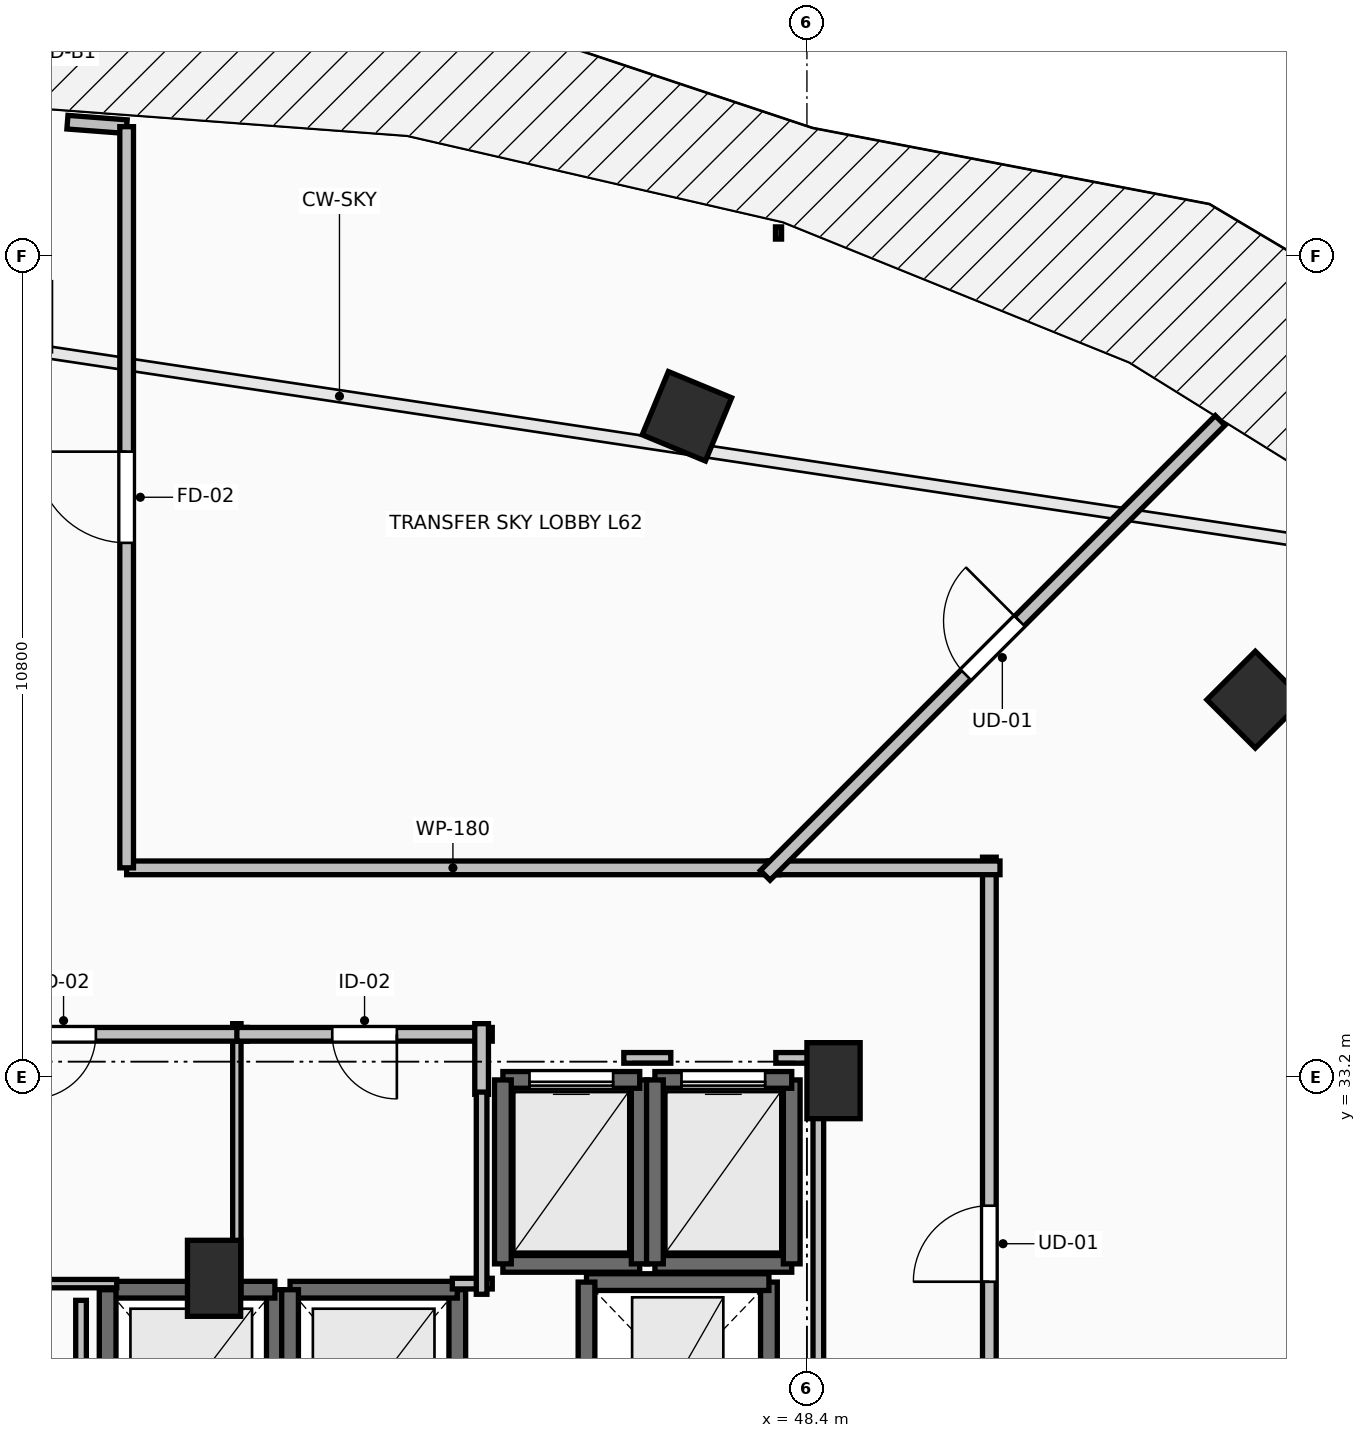
"""IFC4 building model, lengths in metres.
Left out: names, types, materials, properties, quantities, classifications, styles, units other than length and angle.
Written with IfcOpenShell. Run it as: python <this file> out.ifc"""

import sys

from ifc_helpers import new_model, si_unit, direction, frame, frame_2d, origin, origin_2d, place, context, subcontext, project, spatial, rectangle, extrude, element, fill, save


model = new_model("IFC4")
c1 = context("Model", 3, precision=1e-05, world=origin(), true_north=direction((0.0, 1.0)))
c2 = subcontext(c1, "Body", "Model", "MODEL_VIEW")
j1 = project(units=[si_unit("LENGTHUNIT", "METRE"), si_unit("PLANEANGLEUNIT", "RADIAN")], contexts=[c1])
p1 = place(None, origin())
s1 = spatial("IfcSite", under=j1, at=p1, CompositionType="ELEMENT")
p2 = place(p1, origin())
s2 = spatial("IfcBuilding", under=s1, at=p2, CompositionType="ELEMENT")
p3 = place(p2, frame((0.0, 0.0, 229.75)))
s3 = spatial("IfcBuildingStorey", under=s2, at=p3, CompositionType="ELEMENT", Elevation=229.75)
for number, where, z_axis, x_axis in (
    (1, (54.299, 38.162, 0.0), (0.0, 0.0, 1.0), (0.707, 0.707, 0.0)),
    (2, (46.821, 41.891, 0.0), (0.0, 0.0, 1.0), (0.383, 0.924, 0.0)),
):
    element("IfcColumn", number, at=place(p3, frame(where, z_axis=z_axis, x_axis=x_axis)), inside=s3, PredefinedType="COLUMN", context=c2, shape_type="SweptSolid", body=[
        extrude(rectangle(XDim=0.9, YDim=0.9, at=origin_2d()), origin(), (0.0, 0.0, 1.0), 4.5),
    ])
for number, where, z_axis, x_axis in (
    (3, (48.75, 33.15, 0.0), (0.0, 0.0, 1.0), (1.0, 0.0, 0.0)),
    (4, (40.6, 30.55, 0.0), (0.0, 0.0, 1.0), (1.0, 0.0, 0.0)),
):
    element("IfcColumn", number, at=place(p3, frame(where, z_axis=z_axis, x_axis=x_axis)), inside=s3, PredefinedType="PILASTER", context=c2, shape_type="SweptSolid", body=[
        extrude(rectangle(XDim=0.7, YDim=1.0, at=origin_2d()), origin(), (0.0, 0.0, 1.0), 4.5),
    ])
p4 = place(p3, frame((41.4, 27.8, 0.0), z_axis=(0.0, 0.0, 1.0), x_axis=(0.0, 1.0, 0.0)))
e5 = element("IfcWall", 5, at=p4, inside=s3, PredefinedType="SOLIDWALL", context=c2, shape_type="SweptSolid", body=[
    extrude(rectangle(XDim=2.6, YDim=0.22, at=frame_2d((1.3, 0.0))), origin(), (0.0, 0.0, 1.0), 4.24),
])
p5 = place(p3, frame((41.4, 30.4, 0.0), z_axis=(0.0, 0.0, 1.0), x_axis=(-1.0, 0.0, 0.0)))
e6 = element("IfcWall", 6, at=p5, inside=s3, PredefinedType="SOLIDWALL", context=c2, shape_type="SweptSolid", body=[
    extrude(rectangle(XDim=2.2, YDim=0.22, at=frame_2d((1.1, 0.0))), origin(), (0.0, 0.0, 1.0), 4.24),
])
for number, where, z_axis, x_axis in (
    (7, (39.2, 30.4, 0.0), (0.0, 0.0, 1.0), (0.0, -1.0, 0.0)),
    (8, (43.8, 27.8, 0.0), (0.0, 0.0, 1.0), (0.0, 1.0, 0.0)),
):
    element("IfcWall", number, at=place(p3, frame(where, z_axis=z_axis, x_axis=x_axis)), inside=s3, PredefinedType="SOLIDWALL", context=c2, shape_type="SweptSolid", body=[
        extrude(rectangle(XDim=2.6, YDim=0.22, at=frame_2d((1.3, 0.0))), origin(), (0.0, 0.0, 1.0), 4.24),
    ])
p6 = place(p3, frame((43.8, 30.4, 0.0), z_axis=(0.0, 0.0, 1.0), x_axis=(-1.0, 0.0, 0.0)))
e9 = element("IfcWall", 9, at=p6, inside=s3, PredefinedType="SOLIDWALL", context=c2, shape_type="SweptSolid", body=[
    extrude(rectangle(XDim=2.2, YDim=0.22, at=frame_2d((1.1, 0.0))), origin(), (0.0, 0.0, 1.0), 4.24),
])
p7 = place(p3, frame((41.6, 30.4, 0.0), z_axis=(0.0, 0.0, 1.0), x_axis=(0.0, -1.0, 0.0)))
e10 = element("IfcWall", 10, at=p7, inside=s3, PredefinedType="SOLIDWALL", context=c2, shape_type="SweptSolid", body=[
    extrude(rectangle(XDim=2.6, YDim=0.22, at=frame_2d((1.3, 0.0))), origin(), (0.0, 0.0, 1.0), 4.24),
])
p8 = place(p3, frame((44.4, 30.74, 0.0), z_axis=(0.0, 0.0, 1.0), x_axis=(1.0, 0.0, 0.0)))
e11 = element("IfcWall", 11, at=p8, inside=s3, PredefinedType="SOLIDWALL", context=c2, shape_type="SweptSolid", body=[
    extrude(rectangle(XDim=1.8, YDim=0.22, at=frame_2d((0.9, 0.0))), origin(), (0.0, 0.0, 1.0), 4.24),
])
p9 = place(p3, frame((46.2, 30.74, 0.0), z_axis=(0.0, 0.0, 1.0), x_axis=(0.0, 1.0, 0.0)))
e12 = element("IfcWall", 12, at=p9, inside=s3, PredefinedType="SOLIDWALL", context=c2, shape_type="SweptSolid", body=[
    extrude(rectangle(XDim=2.42, YDim=0.22, at=frame_2d((1.21, 0.0))), origin(), (0.0, 0.0, 1.0), 4.24),
])
p10 = place(p3, frame((46.2, 33.16, 0.0), z_axis=(0.0, 0.0, 1.0), x_axis=(-1.0, 0.0, 0.0)))
e13 = element("IfcWall", 13, at=p10, inside=s3, PredefinedType="SOLIDWALL", context=c2, shape_type="SweptSolid", body=[
    extrude(rectangle(XDim=1.8, YDim=0.22, at=frame_2d((0.9, 0.0))), origin(), (0.0, 0.0, 1.0), 4.24),
])
p11 = place(p10, frame((0.35, 0.0, 0.0)))
e14 = element("IfcOpeningElement", 14, at=p11, cuts=e13, PredefinedType="OPENING", context=c2, shape_type="SweptSolid", body=[
    extrude(rectangle(XDim=1.1, YDim=2.2, at=frame_2d((0.55, 1.1))), frame((0.0, 0.125, 0.0), z_axis=(0.0, -1.0, 0.0), x_axis=(1.0, 0.0, 0.0)), (0.0, 0.0, 1.0), 0.25),
])
p12 = place(p3, frame((44.4, 33.16, 0.0), z_axis=(0.0, 0.0, 1.0), x_axis=(0.0, -1.0, 0.0)))
e15 = element("IfcWall", 15, at=p12, inside=s3, PredefinedType="SOLIDWALL", context=c2, shape_type="SweptSolid", body=[
    extrude(rectangle(XDim=2.42, YDim=0.22, at=frame_2d((1.21, 0.0))), origin(), (0.0, 0.0, 1.0), 4.24),
])
p13 = place(p3, frame((46.4, 30.74, 0.0), z_axis=(0.0, 0.0, 1.0), x_axis=(1.0, 0.0, 0.0)))
e16 = element("IfcWall", 16, at=p13, inside=s3, PredefinedType="SOLIDWALL", context=c2, shape_type="SweptSolid", body=[
    extrude(rectangle(XDim=1.8, YDim=0.22, at=frame_2d((0.9, 0.0))), origin(), (0.0, 0.0, 1.0), 4.24),
])
p14 = place(p3, frame((48.2, 30.74, 0.0), z_axis=(0.0, 0.0, 1.0), x_axis=(0.0, 1.0, 0.0)))
e17 = element("IfcWall", 17, at=p14, inside=s3, PredefinedType="SOLIDWALL", context=c2, shape_type="SweptSolid", body=[
    extrude(rectangle(XDim=2.42, YDim=0.22, at=frame_2d((1.21, 0.0))), origin(), (0.0, 0.0, 1.0), 4.24),
])
p15 = place(p3, frame((48.2, 33.16, 0.0), z_axis=(0.0, 0.0, 1.0), x_axis=(-1.0, 0.0, 0.0)))
e18 = element("IfcWall", 18, at=p15, inside=s3, PredefinedType="SOLIDWALL", context=c2, shape_type="SweptSolid", body=[
    extrude(rectangle(XDim=1.8, YDim=0.22, at=frame_2d((0.9, 0.0))), origin(), (0.0, 0.0, 1.0), 4.24),
])
p16 = place(p15, frame((0.35, 0.0, 0.0)))
e19 = element("IfcOpeningElement", 19, at=p16, cuts=e18, PredefinedType="OPENING", context=c2, shape_type="SweptSolid", body=[
    extrude(rectangle(XDim=1.1, YDim=2.2, at=frame_2d((0.55, 1.1))), frame((0.0, 0.125, 0.0), z_axis=(0.0, -1.0, 0.0), x_axis=(1.0, 0.0, 0.0)), (0.0, 0.0, 1.0), 0.25),
])
p17 = place(p3, frame((46.4, 33.16, 0.0), z_axis=(0.0, 0.0, 1.0), x_axis=(0.0, -1.0, 0.0)))
e20 = element("IfcWall", 20, at=p17, inside=s3, PredefinedType="SOLIDWALL", context=c2, shape_type="SweptSolid", body=[
    extrude(rectangle(XDim=2.42, YDim=0.22, at=frame_2d((1.21, 0.0))), origin(), (0.0, 0.0, 1.0), 4.24),
])
p18 = place(p3, frame((47.9, 28.0, 0.0), z_axis=(0.0, 0.0, 1.0), x_axis=(0.0, 1.0, 0.0)))
e21 = element("IfcWall", 21, at=p18, inside=s3, PredefinedType="SHEAR", context=c2, shape_type="SweptSolid", body=[
    extrude(rectangle(XDim=2.5, YDim=0.22, at=frame_2d((1.25, 0.0))), origin(), (0.0, 0.0, 1.0), 4.24),
])
p19 = place(p3, frame((47.9, 30.5, 0.0), z_axis=(0.0, 0.0, 1.0), x_axis=(-1.0, 0.0, 0.0)))
e22 = element("IfcWall", 22, at=p19, inside=s3, PredefinedType="SHEAR", context=c2, shape_type="SweptSolid", body=[
    extrude(rectangle(XDim=2.4, YDim=0.22, at=frame_2d((1.2, 0.0))), origin(), (0.0, 0.0, 1.0), 4.24),
])
p20 = place(p3, frame((45.5, 30.5, 0.0), z_axis=(0.0, 0.0, 1.0), x_axis=(0.0, -1.0, 0.0)))
e23 = element("IfcWall", 23, at=p20, inside=s3, PredefinedType="SHEAR", context=c2, shape_type="SweptSolid", body=[
    extrude(rectangle(XDim=2.5, YDim=0.22, at=frame_2d((1.25, 0.0))), origin(), (0.0, 0.0, 1.0), 4.24),
])
p21 = place(p3, frame((40.9, 30.34, 0.0), z_axis=(0.0, 0.0, 1.0), x_axis=(0.0, 1.0, 0.0)))
e24 = element("IfcWall", 24, at=p21, inside=s3, PredefinedType="PARTITIONING", context=c2, shape_type="SweptSolid", body=[
    extrude(rectangle(XDim=3.56, YDim=0.11, at=frame_2d((1.78, 0.0))), origin(), (0.0, 0.0, 1.0), 4.24),
])
p22 = place(p3, frame((36.11, 30.48, 0.0), z_axis=(0.0, 0.0, 1.0), x_axis=(1.0, 0.0, 0.0)))
e25 = element("IfcWall", 25, at=p22, inside=s3, PredefinedType="PARTITIONING", context=c2, shape_type="SweptSolid", body=[
    extrude(rectangle(XDim=3.21, YDim=0.11, at=frame_2d((1.605, 0.0))), origin(), (0.0, 0.0, 1.0), 3.432),
])
p23 = place(p3, frame((41.04, 33.76, 0.0), z_axis=(0.0, 0.0, 1.0), x_axis=(-1.0, 0.0, 0.0)))
e26 = element("IfcWall", 26, at=p23, inside=s3, PredefinedType="PARTITIONING", context=c2, shape_type="SweptSolid", body=[
    extrude(rectangle(XDim=4.84, YDim=0.18, at=frame_2d((2.42, 0.0))), origin(), (0.0, 0.0, 1.0), 4.24),
])
p24 = place(p23, frame((1.995, 0.0, 0.0)))
e27 = element("IfcOpeningElement", 27, at=p24, cuts=e26, PredefinedType="OPENING", context=c2, shape_type="SweptSolid", body=[
    extrude(rectangle(XDim=0.85, YDim=2.1, at=frame_2d((0.425, 1.05))), frame((0.0, 0.105, 0.0), z_axis=(0.0, -1.0, 0.0), x_axis=(1.0, 0.0, 0.0)), (0.0, 0.0, 1.0), 0.21),
])
p25 = place(p3, frame((44.26, 33.76, 0.0), z_axis=(0.0, 0.0, 1.0), x_axis=(-1.0, 0.0, 0.0)))
e28 = element("IfcWall", 28, at=p25, inside=s3, PredefinedType="PARTITIONING", context=c2, shape_type="SweptSolid", body=[
    extrude(rectangle(XDim=3.36, YDim=0.18, at=frame_2d((1.68, 0.0))), origin(), (0.0, 0.0, 1.0), 4.24),
])
p26 = place(p25, frame((1.255, 0.0, 0.0)))
e29 = element("IfcOpeningElement", 29, at=p26, cuts=e28, PredefinedType="OPENING", context=c2, shape_type="SweptSolid", body=[
    extrude(rectangle(XDim=0.85, YDim=2.1, at=frame_2d((0.425, 1.05))), frame((0.0, 0.105, 0.0), z_axis=(0.0, -1.0, 0.0), x_axis=(1.0, 0.0, 0.0)), (0.0, 0.0, 1.0), 0.21),
])
p27 = place(p3, frame((44.12, 32.97, 0.0), z_axis=(0.0, 0.0, 1.0), x_axis=(0.0, 1.0, 0.0)))
e30 = element("IfcWall", 30, at=p27, inside=s3, PredefinedType="PARTITIONING", context=c2, shape_type="SweptSolid", body=[
    extrude(rectangle(XDim=0.93, YDim=0.18, at=frame_2d((0.465, 0.0))), origin(), (0.0, 0.0, 1.0), 4.24),
])
p28 = place(p3, frame((39.45, 45.701, 0.0), z_axis=(0.0, 0.0, 1.0), x_axis=(-0.997136622012, 0.0756211415, 0.0)))
e31 = element("IfcWall", 31, at=p28, inside=s3, PredefinedType="PARTITIONING", context=c2, shape_type="SweptSolid", body=[
    extrude(rectangle(XDim=0.781, YDim=0.18, at=frame_2d((0.391, 0.0))), origin(), (0.0, 0.0, 1.0), 4.24),
])
p29 = place(p3, frame((48.035, 35.95, 0.0), z_axis=(0.0, 0.0, 1.0), x_axis=(-1.0, 0.0, 0.0)))
e32 = element("IfcWall", 32, at=p29, inside=s3, PredefinedType="PARTITIONING", context=c2, shape_type="SweptSolid", body=[
    extrude(rectangle(XDim=8.585, YDim=0.18, at=frame_2d((4.292, 0.0))), origin(), (0.0, 0.0, 1.0), 3.432),
])
p30 = place(p3, frame((39.45, 35.95, 0.0), z_axis=(0.0, 0.0, 1.0), x_axis=(0.0, 1.0, 0.0)))
e33 = element("IfcWall", 33, at=p30, inside=s3, PredefinedType="PARTITIONING", context=c2, shape_type="SweptSolid", body=[
    extrude(rectangle(XDim=9.751, YDim=0.18, at=frame_2d((4.875, 0.0))), origin(), (0.0, 0.0, 1.0), 3.774),
])
p31 = place(p30, frame((4.275, 0.0, 0.0)))
e34 = element("IfcOpeningElement", 34, at=p31, cuts=e33, PredefinedType="OPENING", context=c2, shape_type="SweptSolid", body=[
    extrude(rectangle(XDim=1.2, YDim=2.15, at=frame_2d((0.6, 1.075))), frame((0.0, 0.105, 0.0), z_axis=(0.0, -1.0, 0.0), x_axis=(1.0, 0.0, 0.0)), (0.0, 0.0, 1.0), 0.21),
])
p32 = place(p3, frame((50.8, 25.92, 0.0), z_axis=(0.0, 0.0, 1.0), x_axis=(0.0, 1.0, 0.0)))
e35 = element("IfcWall", 35, at=p32, inside=s3, PredefinedType="PARTITIONING", context=c2, shape_type="SweptSolid", body=[
    extrude(rectangle(XDim=10.17, YDim=0.18, at=frame_2d((5.085, 0.0))), origin(), (0.0, 0.0, 1.0), 3.432),
])
p33 = place(p32, frame((4.585, 0.0, 0.0)))
e36 = element("IfcOpeningElement", 36, at=p33, cuts=e35, PredefinedType="OPENING", context=c2, shape_type="SweptSolid", body=[
    extrude(rectangle(XDim=1.0, YDim=2.15, at=frame_2d((0.5, 1.075))), frame((0.0, 0.105, 0.0), z_axis=(0.0, -1.0, 0.0), x_axis=(1.0, 0.0, 0.0)), (0.0, 0.0, 1.0), 0.21),
])
p34 = place(p3, frame((50.94, 35.95, 0.0), z_axis=(0.0, 0.0, 1.0), x_axis=(-1.0, 0.0, 0.0)))
e37 = element("IfcWall", 37, at=p34, inside=s3, PredefinedType="PARTITIONING", context=c2, shape_type="SweptSolid", body=[
    extrude(rectangle(XDim=3.045, YDim=0.18, at=frame_2d((1.522, 0.0))), origin(), (0.0, 0.0, 1.0), 3.432),
])
p35 = place(p3, frame((47.851, 35.851, 0.0), z_axis=(0.0, 0.0, 1.0), x_axis=(0.707106781187, 0.707106781187, 0.0)))
e38 = element("IfcWall", 38, at=p35, inside=s3, PredefinedType="PARTITIONING", context=c2, shape_type="SweptSolid", body=[
    extrude(rectangle(XDim=8.464, YDim=0.18, at=frame_2d((4.232, 0.0))), origin(), (0.0, 0.0, 1.0), 3.432),
])
p36 = place(p35, frame((3.732, 0.0, 0.0)))
e39 = element("IfcOpeningElement", 39, at=p36, cuts=e38, PredefinedType="OPENING", context=c2, shape_type="SweptSolid", body=[
    extrude(rectangle(XDim=1.0, YDim=2.15, at=frame_2d((0.5, 1.075))), frame((0.0, 0.105, 0.0), z_axis=(0.0, -1.0, 0.0), x_axis=(1.0, 0.0, 0.0)), (0.0, 0.0, 1.0), 0.21),
])
p37 = place(p3, frame((43.735, 30.48, 0.0), z_axis=(0.0, 0.0, 1.0), x_axis=(1.0, 0.0, 0.0)))
e40 = element("IfcWall", 40, at=p37, inside=s3, PredefinedType="PARTITIONING", context=c2, shape_type="SweptSolid", body=[
    extrude(rectangle(XDim=0.525, YDim=0.14, at=frame_2d((0.262, 0.0))), origin(), (0.0, 0.0, 1.0), 4.24),
])
p38 = place(p3, frame((44.12, 30.34, 0.0), z_axis=(0.0, 0.0, 1.0), x_axis=(0.0, 1.0, 0.0)))
e41 = element("IfcWall", 41, at=p38, inside=s3, PredefinedType="PARTITIONING", context=c2, shape_type="SweptSolid", body=[
    extrude(rectangle(XDim=2.66, YDim=0.14, at=frame_2d((1.33, 0.0))), origin(), (0.0, 0.0, 1.0), 4.24),
])
p39 = place(p3, frame((38.85, 27.87, 0.0), z_axis=(0.0, 0.0, 1.0), x_axis=(0.0, 1.0, 0.0)))
e42 = element("IfcWall", 42, at=p39, inside=s3, PredefinedType="PARTITIONING", context=c2, shape_type="SweptSolid", body=[
    extrude(rectangle(XDim=2.39, YDim=0.14, at=frame_2d((1.195, 0.0))), origin(), (0.0, 0.0, 1.0), 4.24),
])
p40 = place(p3, frame((48.55, 28.196, 0.0), z_axis=(0.0, 0.0, 1.0), x_axis=(0.0, 1.0, 0.0)))
e43 = element("IfcWall", 43, at=p40, inside=s3, PredefinedType="PARTITIONING", context=c2, shape_type="SweptSolid", body=[
    extrude(rectangle(XDim=5.254, YDim=0.14, at=frame_2d((2.627, 0.0))), origin(), (0.0, 0.0, 1.0), 3.432),
])
p41 = place(p3, frame((48.55, 33.45, 0.0), z_axis=(0.0, 0.0, 1.0), x_axis=(-1.0, 0.0, 0.0)))
e44 = element("IfcWall", 44, at=p41, inside=s3, PredefinedType="PARTITIONING", context=c2, shape_type="SweptSolid", body=[
    extrude(rectangle(XDim=0.559, YDim=0.14, at=frame_2d((0.28, 0.0))), origin(), (0.0, 0.0, 1.0), 3.432),
])
p42 = place(p3, frame((46.609, 33.45, 0.0), z_axis=(0.0, 0.0, 1.0), x_axis=(-1.0, 0.0, 0.0)))
e45 = element("IfcWall", 45, at=p42, inside=s3, PredefinedType="PARTITIONING", context=c2, shape_type="SweptSolid", body=[
    extrude(rectangle(XDim=0.618, YDim=0.14, at=frame_2d((0.309, 0.0))), origin(), (0.0, 0.0, 1.0), 4.24),
])
p43 = place(p11, origin())
e46 = element("IfcDoor", 46, at=p43, inside=s3, OperationType="SLIDING_TO_LEFT", PredefinedType="DOOR", context=c2, shape_type="SweptSolid", body=[
    extrude(rectangle(XDim=1.1, YDim=2.2, at=frame_2d((0.55, 1.1))), frame((0.0, 0.025, 0.0), z_axis=(0.0, -1.0, 0.0), x_axis=(1.0, 0.0, 0.0)), (0.0, 0.0, 1.0), 0.05),
])
fill(e14, e46)
p44 = place(p16, origin())
e47 = element("IfcDoor", 47, at=p44, inside=s3, OperationType="SLIDING_TO_LEFT", PredefinedType="DOOR", context=c2, shape_type="SweptSolid", body=[
    extrude(rectangle(XDim=1.1, YDim=2.2, at=frame_2d((0.55, 1.1))), frame((0.0, 0.025, 0.0), z_axis=(0.0, -1.0, 0.0), x_axis=(1.0, 0.0, 0.0)), (0.0, 0.0, 1.0), 0.05),
])
fill(e19, e47)
p45 = place(p24, origin())
e48 = element("IfcDoor", 48, at=p45, inside=s3, OperationType="SINGLE_SWING_RIGHT", PredefinedType="DOOR", context=c2, shape_type="SweptSolid", body=[
    extrude(rectangle(XDim=0.85, YDim=2.1, at=frame_2d((0.425, 1.05))), frame((0.0, 0.025, 0.0), z_axis=(0.0, -1.0, 0.0), x_axis=(1.0, 0.0, 0.0)), (0.0, 0.0, 1.0), 0.05),
])
fill(e27, e48)
p46 = place(p26, origin())
e49 = element("IfcDoor", 49, at=p46, inside=s3, OperationType="SINGLE_SWING_LEFT", PredefinedType="DOOR", context=c2, shape_type="SweptSolid", body=[
    extrude(rectangle(XDim=0.85, YDim=2.1, at=frame_2d((0.425, 1.05))), frame((0.0, 0.025, 0.0), z_axis=(0.0, -1.0, 0.0), x_axis=(1.0, 0.0, 0.0)), (0.0, 0.0, 1.0), 0.05),
])
fill(e29, e49)
p47 = place(p31, origin())
e50 = element("IfcDoor", 50, at=p47, inside=s3, OperationType="SINGLE_SWING_RIGHT", PredefinedType="DOOR", context=c2, shape_type="SweptSolid", body=[
    extrude(rectangle(XDim=1.2, YDim=2.15, at=frame_2d((0.6, 1.075))), frame((0.0, 0.025, 0.0), z_axis=(0.0, -1.0, 0.0), x_axis=(1.0, 0.0, 0.0)), (0.0, 0.0, 1.0), 0.05),
])
fill(e34, e50)
p48 = place(p33, origin())
e51 = element("IfcDoor", 51, at=p48, inside=s3, OperationType="SINGLE_SWING_LEFT", PredefinedType="DOOR", context=c2, shape_type="SweptSolid", body=[
    extrude(rectangle(XDim=1.0, YDim=2.15, at=frame_2d((0.5, 1.075))), frame((0.0, 0.025, 0.0), z_axis=(0.0, -1.0, 0.0), x_axis=(1.0, 0.0, 0.0)), (0.0, 0.0, 1.0), 0.05),
])
fill(e36, e51)
p49 = place(p36, origin())
e52 = element("IfcDoor", 52, at=p49, inside=s3, OperationType="SINGLE_SWING_RIGHT", PredefinedType="DOOR", context=c2, shape_type="SweptSolid", body=[
    extrude(rectangle(XDim=1.0, YDim=2.15, at=frame_2d((0.5, 1.075))), frame((0.0, 0.025, 0.0), z_axis=(0.0, -1.0, 0.0), x_axis=(1.0, 0.0, 0.0)), (0.0, 0.0, 1.0), 0.05),
])
fill(e39, e52)
save(model, sys.argv[1])
